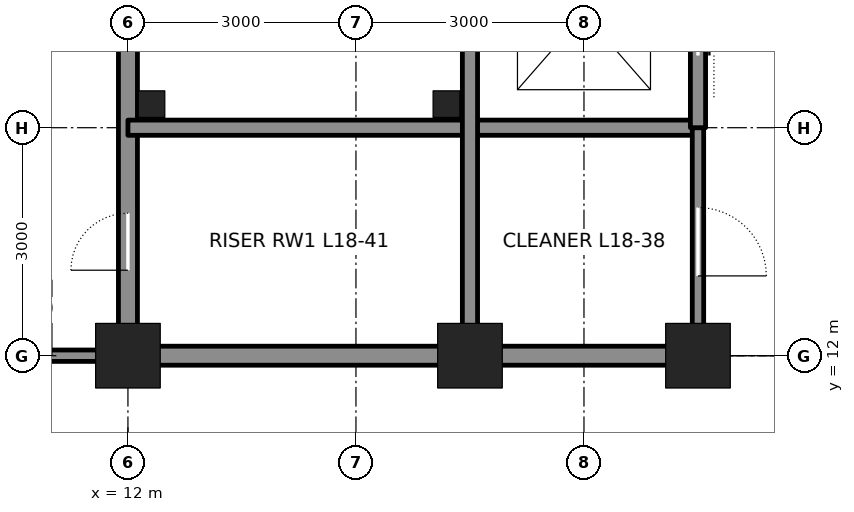
"""IFC4 building model, lengths in metres.
Left out: names, types, materials, properties, quantities, classifications, styles, units other than length and angle.
Written with IfcOpenShell. Run it as: python <this file> out.ifc"""

import sys

from ifc_helpers import new_model, si_unit, direction, frame, frame_2d, origin, origin_2d, place, context, subcontext, project, spatial, rectangle, hollow_rectangle, extrude, element, fill, save


model = new_model("IFC4")
c1 = context("Model", 3, precision=1e-05, world=origin(), true_north=direction((0.0, 1.0)))
c2 = subcontext(c1, "Body", "Model", "MODEL_VIEW")
j1 = project(units=[si_unit("LENGTHUNIT", "METRE"), si_unit("PLANEANGLEUNIT", "RADIAN")], contexts=[c1])
p1 = place(None, origin())
s1 = spatial("IfcSite", under=j1, at=p1, CompositionType="ELEMENT")
p2 = place(p1, origin())
s2 = spatial("IfcBuilding", under=s1, at=p2, CompositionType="ELEMENT")
p3 = place(p2, frame((0.0, 0.0, 87.3)))
s3 = spatial("IfcBuildingStorey", under=s2, at=p3, CompositionType="ELEMENT", Elevation=87.3)
for number, where, z_axis, x_axis in (
    (1, (12.0, 12.0, 0.0), (0.0, 0.0, 1.0), (1.0, 0.0, 0.0)),
    (2, (16.5, 12.0, 0.0), (0.0, 0.0, 1.0), (1.0, 0.0, 0.0)),
    (3, (19.5, 12.0, 0.0), (0.0, 0.0, 1.0), (1.0, 0.0, 0.0)),
):
    element("IfcColumn", number, at=place(p3, frame(where, z_axis=z_axis, x_axis=x_axis)), inside=s3, PredefinedType="COLUMN", context=c2, shape_type="SweptSolid", body=[
        extrude(hollow_rectangle(XDim=0.85, YDim=0.85, WallThickness=0.085, at=origin_2d()), origin(), (0.0, 0.0, 1.0), 4.5),
    ])
p4 = place(p3, frame((12.0, 12.25, 0.0), z_axis=(0.0, 0.0, 1.0), x_axis=(0.0, 1.0, 0.0)))
e4 = element("IfcWall", 4, at=p4, inside=s3, PredefinedType="SOLIDWALL", context=c2, shape_type="SweptSolid", body=[
    extrude(rectangle(XDim=8.5, YDim=0.25, at=frame_2d((4.25, 0.0))), origin(), (0.0, 0.0, 1.0), 3.113),
])
p5 = place(p4, frame((0.875, 0.0, 0.0)))
e5 = element("IfcOpeningElement", 5, at=p5, cuts=e4, PredefinedType="OPENING", context=c2, shape_type="SweptSolid", body=[
    extrude(rectangle(XDim=0.75, YDim=2.1, at=frame_2d((0.375, 1.05))), frame((0.0, 0.135, 0.0), z_axis=(0.0, -1.0, 0.0), x_axis=(1.0, 0.0, 0.0)), (0.0, 0.0, 1.0), 0.27),
])
p6 = place(p3, frame((12.25, 12.0, 0.0), z_axis=(0.0, 0.0, 1.0), x_axis=(1.0, 0.0, 0.0)))
e6 = element("IfcWall", 6, at=p6, inside=s3, PredefinedType="SOLIDWALL", context=c2, shape_type="SweptSolid", body=[
    extrude(rectangle(XDim=4.0, YDim=0.25, at=frame_2d((2.0, 0.0))), origin(), (0.0, 0.0, 1.0), 3.181),
])
p7 = place(p3, frame((16.75, 12.0, 0.0), z_axis=(0.0, 0.0, 1.0), x_axis=(1.0, 0.0, 0.0)))
e7 = element("IfcWall", 7, at=p7, inside=s3, PredefinedType="SOLIDWALL", context=c2, shape_type="SweptSolid", body=[
    extrude(rectangle(XDim=2.5, YDim=0.25, at=frame_2d((1.25, 0.0))), origin(), (0.0, 0.0, 1.0), 3.181),
])
p8 = place(p3, frame((12.0, 15.0, 0.0), z_axis=(0.0, 0.0, 1.0), x_axis=(1.0, 0.0, 0.0)))
e8 = element("IfcWall", 8, at=p8, inside=s3, PredefinedType="SOLIDWALL", context=c2, shape_type="SweptSolid", body=[
    extrude(rectangle(XDim=7.5, YDim=0.2, at=frame_2d((3.75, 0.0))), origin(), (0.0, 0.0, 1.0), 4.34),
])
p9 = place(p3, frame((16.5, 12.25, 0.0), z_axis=(0.0, 0.0, 1.0), x_axis=(0.0, 1.0, 0.0)))
e9 = element("IfcWall", 9, at=p9, inside=s3, PredefinedType="SOLIDWALL", context=c2, shape_type="SweptSolid", body=[
    extrude(rectangle(XDim=8.5, YDim=0.2, at=frame_2d((4.25, 0.0))), origin(), (0.0, 0.0, 1.0), 3.413),
])
p10 = place(p3, frame((19.5, 12.25, 0.0), z_axis=(0.0, 0.0, 1.0), x_axis=(0.0, 1.0, 0.0)))
e10 = element("IfcWall", 10, at=p10, inside=s3, PredefinedType="PARTITIONING", context=c2, shape_type="SweptSolid", body=[
    extrude(rectangle(XDim=2.75, YDim=0.15, at=frame_2d((1.375, 0.0))), origin(), (0.0, 0.0, 1.0), 3.365),
])
p11 = place(p10, frame((0.8, 0.0, 0.0)))
e11 = element("IfcOpeningElement", 11, at=p11, cuts=e10, PredefinedType="OPENING", context=c2, shape_type="SweptSolid", body=[
    extrude(rectangle(XDim=0.9, YDim=2.1, at=frame_2d((0.45, 1.05))), frame((0.0, 0.085, 0.0), z_axis=(0.0, -1.0, 0.0), x_axis=(1.0, 0.0, 0.0)), (0.0, 0.0, 1.0), 0.17),
])
p12 = place(p3, frame((19.5, 15.0, 0.0), z_axis=(0.0, 0.0, 1.0), x_axis=(0.0, 1.0, 0.0)))
e12 = element("IfcWall", 12, at=p12, inside=s3, PredefinedType="SOLIDWALL", context=c2, shape_type="SweptSolid", body=[
    extrude(rectangle(XDim=12.0, YDim=0.2, at=frame_2d((6.0, 0.0))), origin(), (0.0, 0.0, 1.0), 3.365),
])
p13 = place(p12, frame((0.95, 0.0, 0.0)))
e13 = element("IfcOpeningElement", 13, at=p13, cuts=e12, PredefinedType="OPENING", context=c2, shape_type="SweptSolid", body=[
    extrude(rectangle(XDim=1.1, YDim=2.1, at=frame_2d((0.55, 1.05))), frame((0.0, 0.11, 0.0), z_axis=(0.0, -1.0, 0.0), x_axis=(1.0, 0.0, 0.0)), (0.0, 0.0, 1.0), 0.22),
])
p14 = place(p12, frame((3.95, 0.0, 0.0)))
e14 = element("IfcOpeningElement", 14, at=p14, cuts=e12, PredefinedType="OPENING", context=c2, shape_type="SweptSolid", body=[
    extrude(rectangle(XDim=1.1, YDim=2.1, at=frame_2d((0.55, 1.05))), frame((0.0, 0.11, 0.0), z_axis=(0.0, -1.0, 0.0), x_axis=(1.0, 0.0, 0.0)), (0.0, 0.0, 1.0), 0.22),
])
p15 = place(p12, frame((6.95, 0.0, 0.0)))
e15 = element("IfcOpeningElement", 15, at=p15, cuts=e12, PredefinedType="OPENING", context=c2, shape_type="SweptSolid", body=[
    extrude(rectangle(XDim=1.1, YDim=2.1, at=frame_2d((0.55, 1.05))), frame((0.0, 0.11, 0.0), z_axis=(0.0, -1.0, 0.0), x_axis=(1.0, 0.0, 0.0)), (0.0, 0.0, 1.0), 0.22),
])
p16 = place(p12, frame((9.95, 0.0, 0.0)))
e16 = element("IfcOpeningElement", 16, at=p16, cuts=e12, PredefinedType="OPENING", context=c2, shape_type="SweptSolid", body=[
    extrude(rectangle(XDim=1.1, YDim=2.1, at=frame_2d((0.55, 1.05))), frame((0.0, 0.11, 0.0), z_axis=(0.0, -1.0, 0.0), x_axis=(1.0, 0.0, 0.0)), (0.0, 0.0, 1.0), 0.22),
])
p17 = place(p3, frame((9.0, 12.0, -0.3), z_axis=(0.0, 0.0, 1.0), x_axis=(1.0, 0.0, 0.0)))
e17 = element("IfcWall", 17, at=p17, inside=s3, PredefinedType="PARTITIONING", context=c2, shape_type="SweptSolid", body=[
    extrude(rectangle(XDim=3.0, YDim=0.15, at=frame_2d((1.5, 0.0))), origin(), (0.0, 0.0, 1.0), 3.481),
])
p18 = place(p17, frame((1.0, 0.0, 0.3)))
e18 = element("IfcOpeningElement", 18, at=p18, cuts=e17, PredefinedType="OPENING", context=c2, shape_type="SweptSolid", body=[
    extrude(rectangle(XDim=1.0, YDim=2.4, at=frame_2d((0.5, 1.2))), frame((0.0, 0.085, 0.0), z_axis=(0.0, -1.0, 0.0), x_axis=(1.0, 0.0, 0.0)), (0.0, 0.0, 1.0), 0.17),
])
for number, where, z_axis, x_axis in (
    (19, (12.31, 15.31, 0.0), (0.0, 0.0, 1.0), (1.0, 0.0, 0.0)),
    (20, (16.19, 15.31, 0.0), (0.0, 0.0, 1.0), (1.0, 0.0, 0.0)),
):
    element("IfcColumn", number, at=place(p3, frame(where, z_axis=z_axis, x_axis=x_axis)), inside=s3, PredefinedType="COLUMN", context=c2, shape_type="SweptSolid", body=[
        extrude(hollow_rectangle(XDim=0.35, YDim=0.35, WallThickness=0.035, at=origin_2d()), origin(), (0.0, 0.0, 1.0), 4.5),
    ])
p19 = place(p5, origin())
e21 = element("IfcDoor", 21, at=p19, inside=s3, OperationType="SINGLE_SWING_LEFT", PredefinedType="DOOR", context=c2, shape_type="SweptSolid", body=[
    extrude(rectangle(XDim=0.75, YDim=2.1, at=frame_2d((0.375, 1.05))), frame((0.0, 0.025, 0.0), z_axis=(0.0, -1.0, 0.0), x_axis=(1.0, 0.0, 0.0)), (0.0, 0.0, 1.0), 0.05),
])
fill(e5, e21)
p20 = place(p11, frame((0.9, 0.0, 0.0), z_axis=(0.0, 0.0, 1.0), x_axis=(-1.0, 0.0, 0.0)))
e22 = element("IfcDoor", 22, at=p20, inside=s3, OperationType="SINGLE_SWING_RIGHT", PredefinedType="DOOR", context=c2, shape_type="SweptSolid", body=[
    extrude(rectangle(XDim=0.9, YDim=2.1, at=frame_2d((0.45, 1.05))), frame((0.0, 0.025, 0.0), z_axis=(0.0, -1.0, 0.0), x_axis=(1.0, 0.0, 0.0)), (0.0, 0.0, 1.0), 0.05),
])
fill(e11, e22)
p21 = place(p13, origin())
e23 = element("IfcDoor", 23, at=p21, inside=s3, OperationType="DOUBLE_DOOR_SLIDING", PredefinedType="DOOR", context=c2, shape_type="SweptSolid", body=[
    extrude(rectangle(XDim=1.1, YDim=2.1, at=frame_2d((0.55, 1.05))), frame((0.0, 0.025, 0.0), z_axis=(0.0, -1.0, 0.0), x_axis=(1.0, 0.0, 0.0)), (0.0, 0.0, 1.0), 0.05),
])
fill(e13, e23)
save(model, sys.argv[1])
